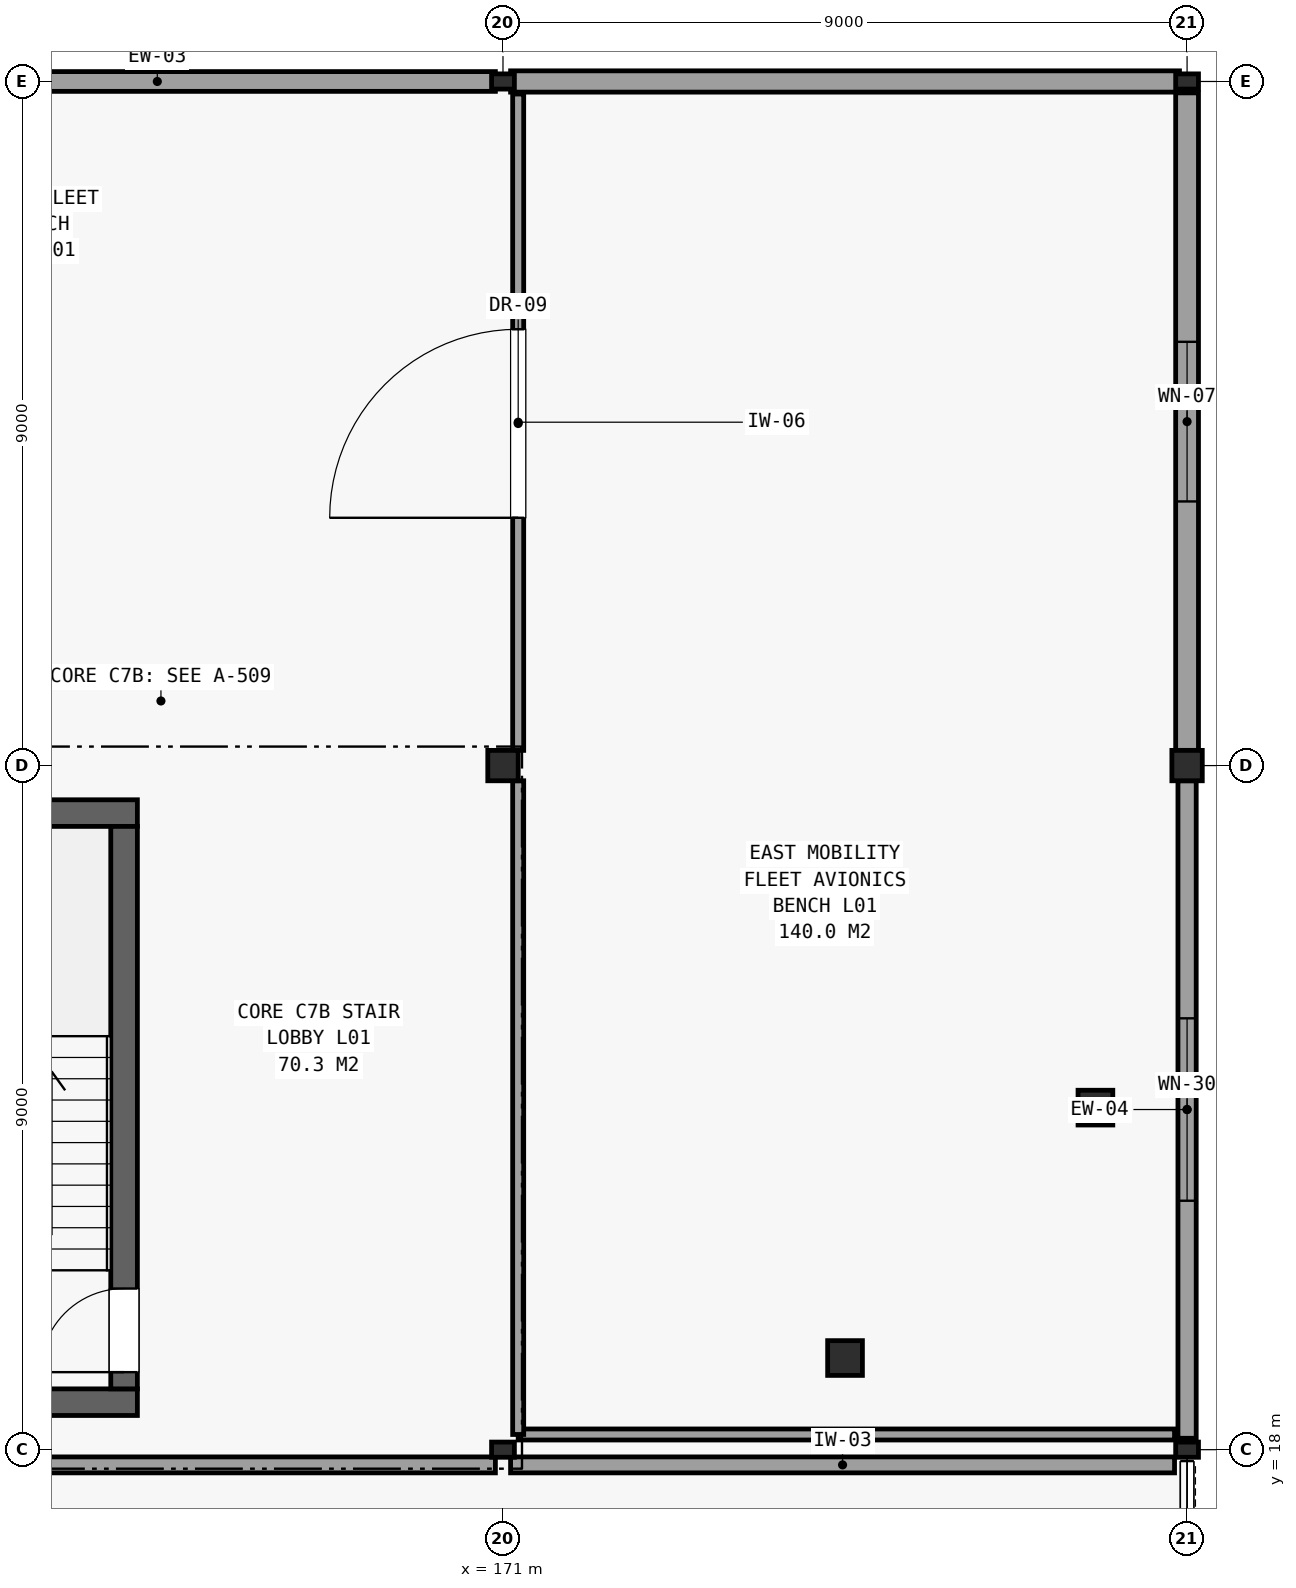
"""IFC4 building model, lengths in metres.
Left out: names, types, materials, properties, quantities, classifications, styles, units other than length and angle.
Written with IfcOpenShell. Run it as: python <this file> out.ifc"""

import sys

from ifc_helpers import new_model, si_unit, direction, frame, frame_2d, origin, origin_2d, place, context, subcontext, project, spatial, rectangle, hollow_rectangle, hollow_circle, i_section, extrude, element, fill, save


model = new_model("IFC4")
c1 = context("Model", 3, precision=1e-05, world=origin(), true_north=direction((0.0, 1.0)))
c2 = subcontext(c1, "Body", "Model", "MODEL_VIEW")
j1 = project(units=[si_unit("LENGTHUNIT", "METRE"), si_unit("PLANEANGLEUNIT", "RADIAN")], contexts=[c1])
p1 = place(None, origin())
s1 = spatial("IfcSite", under=j1, at=p1, CompositionType="ELEMENT")
p2 = place(p1, origin())
s2 = spatial("IfcBuilding", under=s1, at=p2, CompositionType="ELEMENT")
p3 = place(p2, frame((0.0, 0.0, 5.1)))
s3 = spatial("IfcBuildingStorey", under=s2, at=p3, CompositionType="ELEMENT", Elevation=5.1)
p4 = place(p3, frame((171.0, 18.0, 0.0), z_axis=(0.0, 0.0, 1.0), x_axis=(1.0, 0.0, 0.0)))
e1 = element("IfcColumn", 1, at=p4, inside=s3, PredefinedType="COLUMN", context=c2, shape_type="SweptSolid", body=[
    extrude(hollow_rectangle(XDim=0.2, YDim=0.3, WallThickness=0.012, at=origin_2d()), origin(), (0.0, 0.0, 1.0), 4.2),
])
p5 = place(p3, frame((171.0, 27.0, 0.0), z_axis=(0.0, 0.0, 1.0), x_axis=(1.0, 0.0, 0.0)))
e2 = element("IfcColumn", 2, at=p5, inside=s3, PredefinedType="COLUMN", context=c2, shape_type="SweptSolid", body=[
    extrude(i_section(OverallWidth=0.4, OverallDepth=0.4, WebThickness=0.013, FlangeThickness=0.021, FilletRadius=0.016, at=origin_2d()), origin(), (0.0, 0.0, 1.0), 4.2),
])
p6 = place(p3, frame((171.0, 36.0, 0.0), z_axis=(0.0, 0.0, 1.0), x_axis=(1.0, 0.0, 0.0)))
e3 = element("IfcColumn", 3, at=p6, inside=s3, PredefinedType="COLUMN", context=c2, shape_type="SweptSolid", body=[
    extrude(hollow_rectangle(XDim=0.2, YDim=0.3, WallThickness=0.012, at=origin_2d()), origin(), (0.0, 0.0, 1.0), 4.2),
])
for number, where, z_axis, x_axis in (
    (4, (175.5, 19.206, 0.0), (0.0, 0.0, 1.0), (1.0, 0.0, 0.0)),
    (5, (178.794, 22.5, 0.0), (0.0, 0.0, 1.0), (1.0, 0.0, 0.0)),
):
    element("IfcColumn", number, at=place(p3, frame(where, z_axis=z_axis, x_axis=x_axis)), inside=s3, PredefinedType="COLUMN", context=c2, shape_type="SweptSolid", body=[
        extrude(hollow_circle(Radius=0.229, WallThickness=0.016, at=origin_2d()), origin(), (0.0, 0.0, 1.0), 4.2),
    ])
p7 = place(p3, frame((180.0, 18.0, 0.0), z_axis=(0.0, 0.0, 1.0), x_axis=(1.0, 0.0, 0.0)))
e6 = element("IfcColumn", 6, at=p7, inside=s3, PredefinedType="COLUMN", context=c2, shape_type="SweptSolid", body=[
    extrude(hollow_rectangle(XDim=0.2, YDim=0.3, WallThickness=0.012, at=origin_2d()), origin(), (0.0, 0.0, 1.0), 4.2),
])
p8 = place(p3, frame((180.0, 27.0, 0.0), z_axis=(0.0, 0.0, 1.0), x_axis=(1.0, 0.0, 0.0)))
e7 = element("IfcColumn", 7, at=p8, inside=s3, PredefinedType="COLUMN", context=c2, shape_type="SweptSolid", body=[
    extrude(i_section(OverallWidth=0.4, OverallDepth=0.4, WebThickness=0.013, FlangeThickness=0.021, FilletRadius=0.016, at=origin_2d()), origin(), (0.0, 0.0, 1.0), 4.2),
])
p9 = place(p3, frame((180.0, 36.0, 0.0), z_axis=(0.0, 0.0, 1.0), x_axis=(1.0, 0.0, 0.0)))
e8 = element("IfcColumn", 8, at=p9, inside=s3, PredefinedType="COLUMN", context=c2, shape_type="SweptSolid", body=[
    extrude(hollow_rectangle(XDim=0.2, YDim=0.3, WallThickness=0.012, at=origin_2d()), origin(), (0.0, 0.0, 1.0), 4.2),
])
p10 = place(p3, frame((180.0, 18.15, 0.0), z_axis=(0.0, 0.0, 1.0), x_axis=(0.0, 1.0, 0.0)))
e9 = element("IfcWall", 9, at=p10, inside=s3, PredefinedType="SOLIDWALL", context=c2, shape_type="SweptSolid", body=[
    extrude(rectangle(XDim=8.65, YDim=0.24, at=frame_2d((4.325, 0.0))), origin(), (0.0, 0.0, 1.0), 3.29),
])
p11 = place(p10, frame((3.125, 0.0, 0.95)))
e10 = element("IfcOpeningElement", 10, at=p11, cuts=e9, PredefinedType="OPENING", context=c2, shape_type="SweptSolid", body=[
    extrude(rectangle(XDim=2.4, YDim=1.3, at=frame_2d((1.2, 0.65))), frame((0.0, 0.131, 0.0), z_axis=(0.0, -1.0, 0.0), x_axis=(1.0, 0.0, 0.0)), (0.0, 0.0, 1.0), 0.262),
])
p12 = place(p3, frame((180.0, 27.2, 0.0), z_axis=(0.0, 0.0, 1.0), x_axis=(0.0, 1.0, 0.0)))
e11 = element("IfcWall", 11, at=p12, inside=s3, PredefinedType="SOLIDWALL", context=c2, shape_type="SweptSolid", body=[
    extrude(rectangle(XDim=8.65, YDim=0.3, at=frame_2d((4.325, 0.0))), origin(), (0.0, 0.0, 1.0), 3.3),
])
p13 = place(p12, frame((3.275, 0.0, 0.95)))
e12 = element("IfcOpeningElement", 12, at=p13, cuts=e11, PredefinedType="OPENING", context=c2, shape_type="SweptSolid", body=[
    extrude(rectangle(XDim=2.1, YDim=1.3, at=frame_2d((1.05, 0.65))), frame((0.0, 0.161, 0.0), z_axis=(0.0, -1.0, 0.0), x_axis=(1.0, 0.0, 0.0)), (0.0, 0.0, 1.0), 0.322),
])
p14 = place(p3, frame((179.9, 36.0, 0.0), z_axis=(0.0, 0.0, 1.0), x_axis=(-1.0, 0.0, 0.0)))
e13 = element("IfcWall", 13, at=p14, inside=s3, PredefinedType="SOLIDWALL", context=c2, shape_type="SweptSolid", body=[
    extrude(rectangle(XDim=8.8, YDim=0.28, at=frame_2d((4.4, 0.0))), origin(), (0.0, 0.0, 1.0), 3.3),
])
p15 = place(p3, frame((170.9, 36.0, 0.0), z_axis=(0.0, 0.0, 1.0), x_axis=(-1.0, 0.0, 0.0)))
e14 = element("IfcWall", 14, at=p15, inside=s3, PredefinedType="SOLIDWALL", context=c2, shape_type="SweptSolid", body=[
    extrude(rectangle(XDim=8.896, YDim=0.26, at=frame_2d((4.448, 0.0))), origin(), (0.0, 0.0, 1.0), 3.3),
])
for number, where, z_axis, x_axis in (
    (15, (162.21, 18.625, 0.0), (0.0, 0.0, 1.0), (1.0, 0.0, 0.0)),
    (16, (162.21, 26.375, 0.0), (0.0, 0.0, 1.0), (1.0, 0.0, 0.0)),
):
    element("IfcWall", number, at=place(p3, frame(where, z_axis=z_axis, x_axis=x_axis)), inside=s3, PredefinedType="SHEAR", context=c2, shape_type="SweptSolid", body=[
        extrude(rectangle(XDim=3.98, YDim=0.35, at=frame_2d((1.99, 0.0))), origin(), (0.0, 0.0, 1.0), 3.95),
    ])
p16 = place(p3, frame((166.015, 18.8, 0.0), z_axis=(0.0, 0.0, 1.0), x_axis=(0.0, 1.0, 0.0)))
e17 = element("IfcWall", 17, at=p16, inside=s3, PredefinedType="SHEAR", context=c2, shape_type="SweptSolid", body=[
    extrude(rectangle(XDim=7.4, YDim=0.35, at=frame_2d((3.7, 0.0))), origin(), (0.0, 0.0, 1.0), 3.95),
])
p17 = place(p16, frame((0.22, 0.0, 0.0)))
e18 = element("IfcOpeningElement", 18, at=p17, cuts=e17, PredefinedType="OPENING", context=c2, shape_type="SweptSolid", body=[
    extrude(rectangle(XDim=1.1, YDim=2.15, at=frame_2d((0.55, 1.075))), frame((0.0, 0.186, 0.0), z_axis=(0.0, -1.0, 0.0), x_axis=(1.0, 0.0, 0.0)), (0.0, 0.0, 1.0), 0.372),
])
p18 = place(p3, frame((171.2, 18.2, 0.0), z_axis=(0.0, 0.0, 1.0), x_axis=(1.0, 0.0, 0.0)))
e19 = element("IfcWall", 19, at=p18, inside=s3, PredefinedType="PARTITIONING", context=c2, shape_type="SweptSolid", body=[
    extrude(rectangle(XDim=8.635, YDim=0.145, at=frame_2d((4.317, 0.0))), origin(), (0.0, 0.0, 1.0), 3.29),
])
p19 = place(p3, frame((171.2, 18.2, 0.0), z_axis=(0.0, 0.0, 1.0), x_axis=(0.0, 1.0, 0.0)))
e20 = element("IfcWall", 20, at=p19, inside=s3, PredefinedType="PARTITIONING", context=c2, shape_type="SweptSolid", body=[
    extrude(rectangle(XDim=8.6, YDim=0.145, at=frame_2d((4.3, 0.0))), origin(), (0.0, 0.0, 1.0), 3.3),
])
p20 = place(p3, frame((171.2, 27.2, 0.0), z_axis=(0.0, 0.0, 1.0), x_axis=(0.0, 1.0, 0.0)))
e21 = element("IfcWall", 21, at=p20, inside=s3, PredefinedType="PARTITIONING", context=c2, shape_type="SweptSolid", body=[
    extrude(rectangle(XDim=8.635, YDim=0.145, at=frame_2d((4.317, 0.0))), origin(), (0.0, 0.0, 1.0), 3.3),
])
p21 = place(p20, frame((3.06, 0.0, 0.0)))
e22 = element("IfcOpeningElement", 22, at=p21, cuts=e21, PredefinedType="OPENING", context=c2, shape_type="SweptSolid", body=[
    extrude(rectangle(XDim=2.48, YDim=3.026, at=frame_2d((1.24, 1.513))), frame((0.0, 0.083, 0.0), z_axis=(0.0, -1.0, 0.0), x_axis=(1.0, 0.0, 0.0)), (0.0, 0.0, 1.0), 0.167),
])
p22 = place(p3, frame((162.2, 17.8, 0.0), z_axis=(0.0, 0.0, 1.0), x_axis=(1.0, 0.0, 0.0)))
e23 = element("IfcWall", 23, at=p22, inside=s3, PredefinedType="PARTITIONING", context=c2, shape_type="SweptSolid", body=[
    extrude(rectangle(XDim=8.7, YDim=0.21, at=frame_2d((4.35, 0.0))), origin(), (0.0, 0.0, 1.0), 3.29),
])
p23 = place(p3, frame((171.1, 17.8, 0.0), z_axis=(0.0, 0.0, 1.0), x_axis=(1.0, 0.0, 0.0)))
e24 = element("IfcWall", 24, at=p23, inside=s3, PredefinedType="PARTITIONING", context=c2, shape_type="SweptSolid", body=[
    extrude(rectangle(XDim=8.735, YDim=0.21, at=frame_2d((4.367, 0.0))), origin(), (0.0, 0.0, 1.0), 3.29),
])
p24 = place(p11, origin())
e25 = element("IfcWindow", 25, at=p24, inside=s3, PartitioningType="SINGLE_PANEL", PredefinedType="WINDOW", context=c2, shape_type="SweptSolid", body=[
    extrude(rectangle(XDim=2.4, YDim=1.3, at=frame_2d((1.2, 0.65))), frame((0.0, 0.03, 0.0), z_axis=(0.0, -1.0, 0.0), x_axis=(1.0, 0.0, 0.0)), (0.0, 0.0, 1.0), 0.06),
])
fill(e10, e25)
p25 = place(p13, origin())
e26 = element("IfcWindow", 26, at=p25, inside=s3, PartitioningType="SINGLE_PANEL", PredefinedType="WINDOW", context=c2, shape_type="SweptSolid", body=[
    extrude(rectangle(XDim=2.1, YDim=1.3, at=frame_2d((1.05, 0.65))), frame((0.0, 0.03, 0.0), z_axis=(0.0, -1.0, 0.0), x_axis=(1.0, 0.0, 0.0)), (0.0, 0.0, 1.0), 0.06),
])
fill(e12, e26)
p26 = place(p17, origin())
e27 = element("IfcDoor", 27, at=p26, inside=s3, OperationType="SINGLE_SWING_LEFT", PredefinedType="DOOR", context=c2, shape_type="SweptSolid", body=[
    extrude(rectangle(XDim=1.1, YDim=2.15, at=frame_2d((0.55, 1.075))), frame((0.0, 0.025, 0.0), z_axis=(0.0, -1.0, 0.0), x_axis=(1.0, 0.0, 0.0)), (0.0, 0.0, 1.0), 0.05),
])
fill(e18, e27)
p27 = place(p21, origin())
e28 = element("IfcDoor", 28, at=p27, inside=s3, OperationType="SINGLE_SWING_LEFT", PredefinedType="DOOR", context=c2, shape_type="SweptSolid", body=[
    extrude(rectangle(XDim=2.48, YDim=3.026, at=frame_2d((1.24, 1.513))), frame((0.0, 0.025, 0.0), z_axis=(0.0, -1.0, 0.0), x_axis=(1.0, 0.0, 0.0)), (0.0, 0.0, 1.0), 0.05),
])
fill(e22, e28)
save(model, sys.argv[1])
